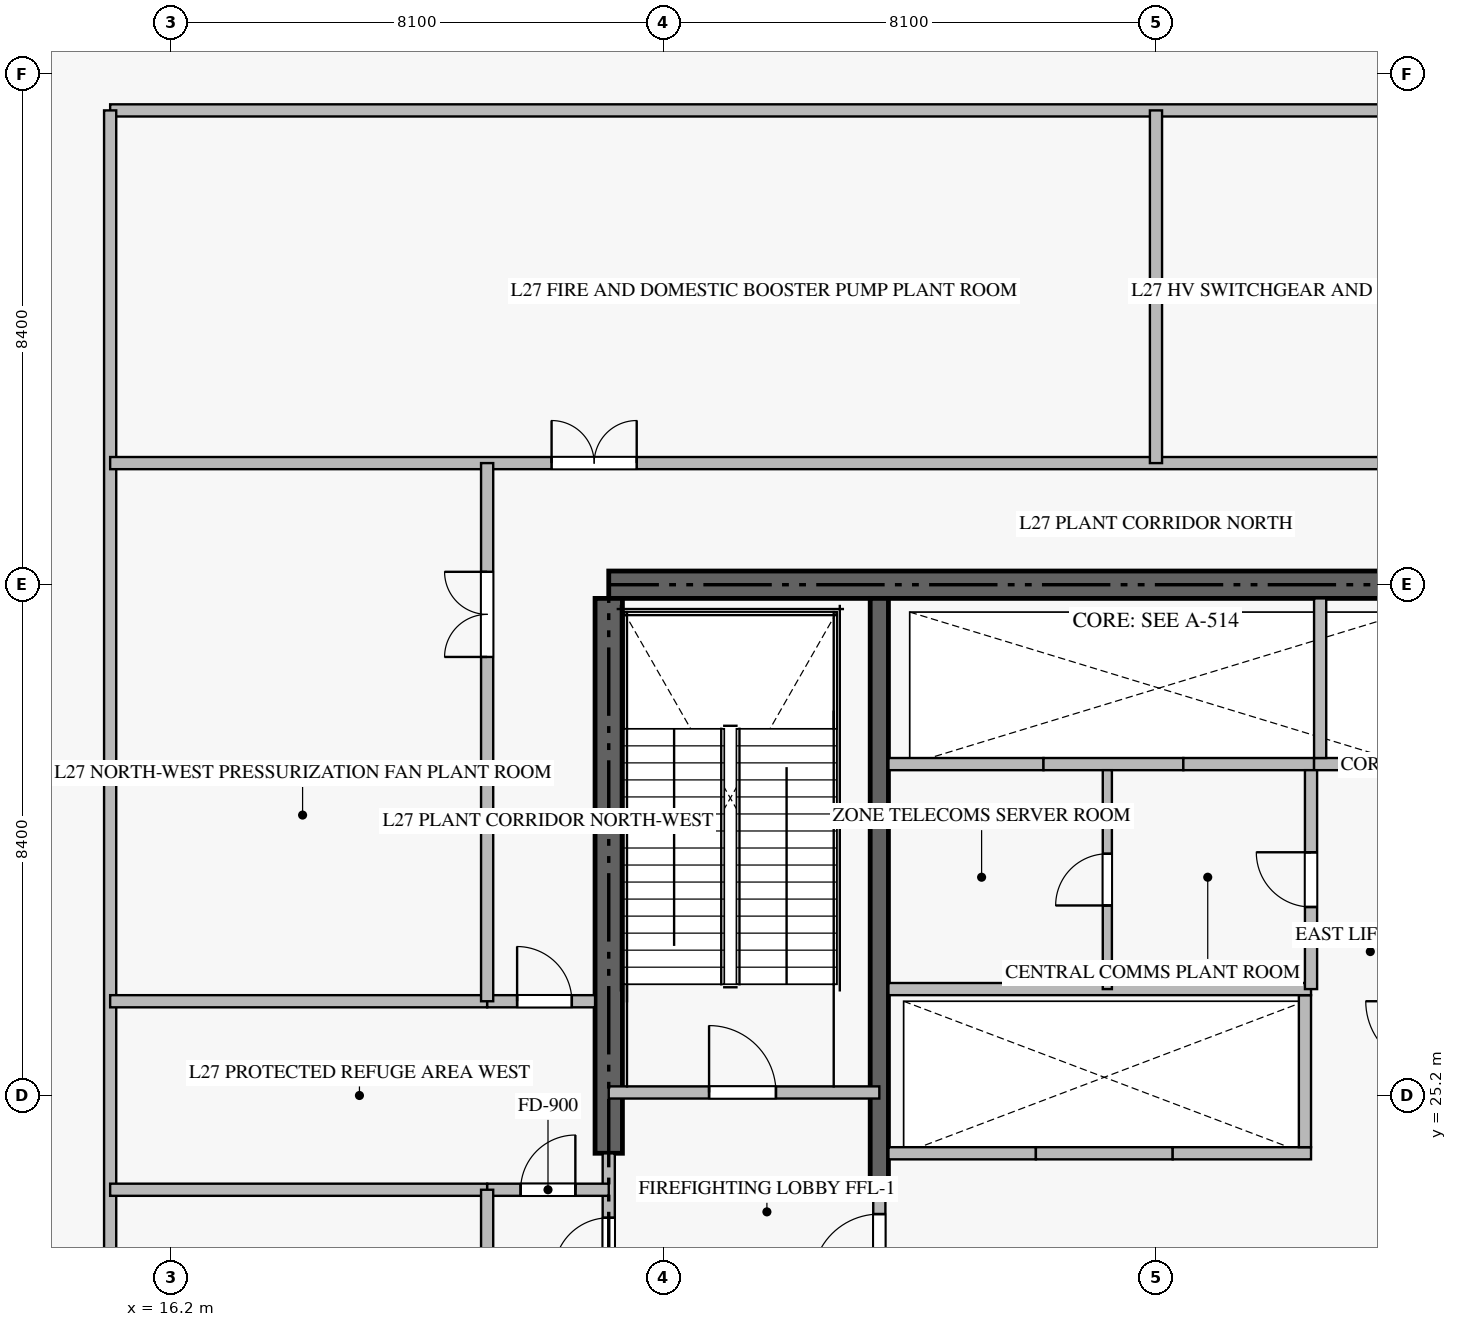
"""IFC4 building model, lengths in metres.
Left out: names, types, materials, properties, quantities, classifications, styles, units other than length and angle.
Written with IfcOpenShell. Run it as: python <this file> out.ifc"""

import sys

from ifc_helpers import new_model, si_unit, direction, frame, frame_2d, origin, place, context, subcontext, project, spatial, rectangle, extrude, source, transform, mapped, element, fill, save


model = new_model("IFC4")
c1 = context("Model", 3, precision=1e-05, world=origin(), true_north=direction((0.0, 1.0)))
c2 = subcontext(c1, "Body", "Model", "MODEL_VIEW")
j1 = project(units=[si_unit("LENGTHUNIT", "METRE"), si_unit("PLANEANGLEUNIT", "RADIAN")], contexts=[c1])
p1 = place(None, origin())
s1 = spatial("IfcSite", under=j1, at=p1, CompositionType="ELEMENT")
p2 = place(p1, origin())
s2 = spatial("IfcBuilding", under=s1, at=p2, CompositionType="ELEMENT")
p3 = place(p2, frame((0.0, 0.0, 109.2)))
s3 = spatial("IfcBuildingStorey", under=s2, at=p3, CompositionType="ELEMENT", Elevation=109.2)
p4 = place(p3, frame((41.4, 33.6, -0.36), z_axis=(0.0, 0.0, 1.0), x_axis=(-1.0, 0.0, 0.0)))
e1 = element("IfcWall", 1, at=p4, inside=s3, PredefinedType="SHEAR", context=c2, shape_type="SweptSolid", body=[
    extrude(rectangle(XDim=18.0, YDim=0.45, at=frame_2d((9.0, 0.0))), origin(), (0.0, 0.0, 1.0), 5.998),
])
p5 = place(p3, frame((23.4, 24.25, -0.36), z_axis=(0.0, 0.0, 1.0), x_axis=(0.0, 1.0, 0.0)))
e2 = element("IfcWall", 2, at=p5, inside=s3, PredefinedType="SHEAR", context=c2, shape_type="SweptSolid", body=[
    extrude(rectangle(XDim=9.125, YDim=0.45, at=frame_2d((4.562, 0.0))), origin(), (0.0, 0.0, 1.0), 5.998),
])
p6 = place(p3, frame((27.85, 23.55, -0.36), z_axis=(0.0, 0.0, 1.0), x_axis=(0.0, 1.0, 0.0)))
e3 = element("IfcWall", 3, at=p6, inside=s3, PredefinedType="SHEAR", context=c2, shape_type="SweptSolid", body=[
    extrude(rectangle(XDim=9.825, YDim=0.3, at=frame_2d((4.913, 0.0))), origin(), (0.0, 0.0, 1.0), 5.998),
])
p7 = place(p3, frame((23.4, 25.25, 0.0), z_axis=(0.0, 0.0, 1.0), x_axis=(1.0, 0.0, 0.0)))
e4 = element("IfcWall", 4, at=p7, inside=s3, PredefinedType="STANDARD", context=c2, shape_type="SweptSolid", body=[
    extrude(rectangle(XDim=4.45, YDim=0.2, at=frame_2d((2.225, 0.0))), origin(), (0.0, 0.0, 1.0), 5.64),
])
p8 = place(p7, frame((1.65, 0.0, 0.0)))
e5 = element("IfcOpeningElement", 5, at=p8, cuts=e4, PredefinedType="OPENING", context=c2, shape_type="SweptSolid", body=[
    extrude(rectangle(XDim=1.1, YDim=2.15, at=frame_2d((0.55, 1.075))), frame((0.0, 0.11, 0.0), z_axis=(0.0, -1.0, 0.0), x_axis=(1.0, 0.0, 0.0)), (0.0, 0.0, 1.0), 0.22),
])
p9 = place(p3, frame((28.0, 24.25, 0.0), z_axis=(0.0, 0.0, 1.0), x_axis=(1.0, 0.0, 0.0)))
e6 = element("IfcWall", 6, at=p9, inside=s3, PredefinedType="STANDARD", context=c2, shape_type="SweptSolid", body=[
    extrude(rectangle(XDim=2.425, YDim=0.2, at=frame_2d((1.212, 0.0))), origin(), (0.0, 0.0, 1.0), 5.64),
])
p10 = place(p3, frame((30.425, 24.25, 0.0), z_axis=(0.0, 0.0, 1.0), x_axis=(1.0, 0.0, 0.0)))
e7 = element("IfcWall", 7, at=p10, inside=s3, PredefinedType="STANDARD", context=c2, shape_type="SweptSolid", body=[
    extrude(rectangle(XDim=2.25, YDim=0.2, at=frame_2d((1.125, 0.0))), origin(), (0.0, 0.0, 1.0), 5.64),
])
p11 = place(p3, frame((32.675, 24.25, 0.0), z_axis=(0.0, 0.0, 1.0), x_axis=(1.0, 0.0, 0.0)))
e8 = element("IfcWall", 8, at=p11, inside=s3, PredefinedType="STANDARD", context=c2, shape_type="SweptSolid", body=[
    extrude(rectangle(XDim=2.275, YDim=0.2, at=frame_2d((1.137, 0.0))), origin(), (0.0, 0.0, 1.0), 5.64),
])
p12 = place(p3, frame((34.85, 24.35, 0.0), z_axis=(0.0, 0.0, 1.0), x_axis=(0.0, 1.0, 0.0)))
e9 = element("IfcWall", 9, at=p12, inside=s3, PredefinedType="STANDARD", context=c2, shape_type="SweptSolid", body=[
    extrude(rectangle(XDim=2.5, YDim=0.2, at=frame_2d((1.25, 0.0))), origin(), (0.0, 0.0, 1.0), 5.64),
])
p13 = place(p3, frame((28.0, 30.65, 0.0), z_axis=(0.0, 0.0, 1.0), x_axis=(1.0, 0.0, 0.0)))
e10 = element("IfcWall", 10, at=p13, inside=s3, PredefinedType="STANDARD", context=c2, shape_type="SweptSolid", body=[
    extrude(rectangle(XDim=2.55, YDim=0.2, at=frame_2d((1.275, 0.0))), origin(), (0.0, 0.0, 1.0), 5.64),
])
p14 = place(p3, frame((30.55, 30.65, 0.0), z_axis=(0.0, 0.0, 1.0), x_axis=(1.0, 0.0, 0.0)))
e11 = element("IfcWall", 11, at=p14, inside=s3, PredefinedType="STANDARD", context=c2, shape_type="SweptSolid", body=[
    extrude(rectangle(XDim=2.3, YDim=0.2, at=frame_2d((1.15, 0.0))), origin(), (0.0, 0.0, 1.0), 5.64),
])
p15 = place(p3, frame((32.85, 30.65, 0.0), z_axis=(0.0, 0.0, 1.0), x_axis=(1.0, 0.0, 0.0)))
e12 = element("IfcWall", 12, at=p15, inside=s3, PredefinedType="STANDARD", context=c2, shape_type="SweptSolid", body=[
    extrude(rectangle(XDim=2.15, YDim=0.2, at=frame_2d((1.075, 0.0))), origin(), (0.0, 0.0, 1.0), 5.64),
])
p16 = place(p3, frame((35.0, 30.65, 0.0), z_axis=(0.0, 0.0, 1.0), x_axis=(1.0, 0.0, 0.0)))
e13 = element("IfcWall", 13, at=p16, inside=s3, PredefinedType="STANDARD", context=c2, shape_type="SweptSolid", body=[
    extrude(rectangle(XDim=1.8, YDim=0.2, at=frame_2d((0.9, 0.0))), origin(), (0.0, 0.0, 1.0), 5.64),
])
p17 = place(p3, frame((35.1, 30.75, 0.0), z_axis=(0.0, 0.0, 1.0), x_axis=(0.0, 1.0, 0.0)))
e14 = element("IfcWall", 14, at=p17, inside=s3, PredefinedType="STANDARD", context=c2, shape_type="SweptSolid", body=[
    extrude(rectangle(XDim=2.625, YDim=0.2, at=frame_2d((1.312, 0.0))), origin(), (0.0, 0.0, 1.0), 5.64),
])
p18 = place(p3, frame((23.4, 21.852, 0.0), z_axis=(0.0, 0.0, 1.0), x_axis=(0.0, 1.0, 0.0)))
e15 = element("IfcWall", 15, at=p18, inside=s3, PredefinedType="STANDARD", context=c2, shape_type="SweptSolid", body=[
    extrude(rectangle(XDim=2.396, YDim=0.2, at=frame_2d((1.198, 0.0))), origin(), (0.0, 0.0, 1.0), 5.64),
])
p19 = place(p18, frame((0.437, 0.0, 0.0)))
e16 = element("IfcOpeningElement", 16, at=p19, cuts=e15, PredefinedType="OPENING", context=c2, shape_type="SweptSolid", body=[
    extrude(rectangle(XDim=0.9, YDim=2.1, at=frame_2d((0.45, 1.05))), frame((0.0, 0.11, 0.0), z_axis=(0.0, -1.0, 0.0), x_axis=(1.0, 0.0, 0.0)), (0.0, 0.0, 1.0), 0.22),
])
p20 = place(p3, frame((27.85, 21.852, 0.0), z_axis=(0.0, 0.0, 1.0), x_axis=(0.0, 1.0, 0.0)))
e17 = element("IfcWall", 17, at=p20, inside=s3, PredefinedType="STANDARD", context=c2, shape_type="SweptSolid", body=[
    extrude(rectangle(XDim=1.696, YDim=0.2, at=frame_2d((0.848, 0.0))), origin(), (0.0, 0.0, 1.0), 5.64),
])
p21 = place(p20, frame((0.298, 0.0, 0.0)))
e18 = element("IfcOpeningElement", 18, at=p21, cuts=e17, PredefinedType="OPENING", context=c2, shape_type="SweptSolid", body=[
    extrude(rectangle(XDim=1.1, YDim=2.15, at=frame_2d((0.55, 1.075))), frame((0.0, 0.11, 0.0), z_axis=(0.0, -1.0, 0.0), x_axis=(1.0, 0.0, 0.0)), (0.0, 0.0, 1.0), 0.22),
])
p22 = place(p3, frame((28.0, 26.95, 0.0), z_axis=(0.0, 0.0, 1.0), x_axis=(1.0, 0.0, 0.0)))
e19 = element("IfcWall", 19, at=p22, inside=s3, PredefinedType="STANDARD", context=c2, shape_type="SweptSolid", body=[
    extrude(rectangle(XDim=6.95, YDim=0.2, at=frame_2d((3.475, 0.0))), origin(), (0.0, 0.0, 1.0), 5.64),
])
p23 = place(p3, frame((34.95, 26.95, 0.0), z_axis=(0.0, 0.0, 1.0), x_axis=(0.0, 1.0, 0.0)))
e20 = element("IfcWall", 20, at=p23, inside=s3, PredefinedType="STANDARD", context=c2, shape_type="SweptSolid", body=[
    extrude(rectangle(XDim=3.6, YDim=0.2, at=frame_2d((1.8, 0.0))), origin(), (0.0, 0.0, 1.0), 5.64),
])
p24 = place(p23, frame((1.35, 0.0, 0.0)))
e21 = element("IfcOpeningElement", 21, at=p24, cuts=e20, PredefinedType="OPENING", context=c2, shape_type="SweptSolid", body=[
    extrude(rectangle(XDim=0.9, YDim=2.1, at=frame_2d((0.45, 1.05))), frame((0.0, 0.11, 0.0), z_axis=(0.0, -1.0, 0.0), x_axis=(1.0, 0.0, 0.0)), (0.0, 0.0, 1.0), 0.22),
])
p25 = place(p3, frame((31.6, 26.95, 0.0), z_axis=(0.0, 0.0, 1.0), x_axis=(0.0, 1.0, 0.0)))
e22 = element("IfcWall", 22, at=p25, inside=s3, PredefinedType="PARTITIONING", context=c2, shape_type="SweptSolid", body=[
    extrude(rectangle(XDim=3.6, YDim=0.15, at=frame_2d((1.8, 0.0))), origin(), (0.0, 0.0, 1.0), 5.64),
])
p26 = place(p25, frame((1.375, 0.0, 0.0)))
e23 = element("IfcOpeningElement", 23, at=p26, cuts=e22, PredefinedType="OPENING", context=c2, shape_type="SweptSolid", body=[
    extrude(rectangle(XDim=0.85, YDim=2.1, at=frame_2d((0.425, 1.05))), frame((0.0, 0.085, 0.0), z_axis=(0.0, -1.0, 0.0), x_axis=(1.0, 0.0, 0.0)), (0.0, 0.0, 1.0), 0.17),
])
p27 = place(p3, frame((15.2, 41.4, 0.0), z_axis=(0.0, 0.0, 1.0), x_axis=(1.0, 0.0, 0.0)))
e24 = element("IfcWall", 24, at=p27, inside=s3, PredefinedType="STANDARD", context=c2, shape_type="SweptSolid", body=[
    extrude(rectangle(XDim=34.4, YDim=0.2, at=frame_2d((17.2, 0.0))), origin(), (0.0, 0.0, 1.0), 5.64),
])
p28 = place(p3, frame((15.2, 9.0, 0.0), z_axis=(0.0, 0.0, 1.0), x_axis=(0.0, 1.0, 0.0)))
e25 = element("IfcWall", 25, at=p28, inside=s3, PredefinedType="STANDARD", context=c2, shape_type="SweptSolid", body=[
    extrude(rectangle(XDim=32.4, YDim=0.2, at=frame_2d((16.2, 0.0))), origin(), (0.0, 0.0, 1.0), 5.072),
])
p29 = place(p3, frame((15.2, 23.65, 0.0), z_axis=(0.0, 0.0, 1.0), x_axis=(1.0, 0.0, 0.0)))
e26 = element("IfcWall", 26, at=p29, inside=s3, PredefinedType="STANDARD", context=c2, shape_type="SweptSolid", body=[
    extrude(rectangle(XDim=6.2, YDim=0.2, at=frame_2d((3.1, 0.0))), origin(), (0.0, 0.0, 1.0), 5.64),
])
p30 = place(p3, frame((21.402, 23.65, 0.0), z_axis=(0.0, 0.0, 1.0), x_axis=(1.0, 0.0, 0.0)))
e27 = element("IfcWall", 27, at=p30, inside=s3, PredefinedType="STANDARD", context=c2, shape_type="SweptSolid", body=[
    extrude(rectangle(XDim=1.998, YDim=0.2, at=frame_2d((0.999, 0.0))), origin(), (0.0, 0.0, 1.0), 5.64),
])
p31 = place(p30, frame((0.549, 0.0, 0.0)))
e28 = element("IfcOpeningElement", 28, at=p31, cuts=e27, PredefinedType="OPENING", context=c2, shape_type="SweptSolid", body=[
    extrude(rectangle(XDim=0.9, YDim=2.1, at=frame_2d((0.45, 1.05))), frame((0.0, 0.11, 0.0), z_axis=(0.0, -1.0, 0.0), x_axis=(1.0, 0.0, 0.0)), (0.0, 0.0, 1.0), 0.22),
])
p32 = place(p3, frame((15.2, 26.75, 0.0), z_axis=(0.0, 0.0, 1.0), x_axis=(1.0, 0.0, 0.0)))
e29 = element("IfcWall", 29, at=p32, inside=s3, PredefinedType="STANDARD", context=c2, shape_type="SweptSolid", body=[
    extrude(rectangle(XDim=6.2, YDim=0.2, at=frame_2d((3.1, 0.0))), origin(), (0.0, 0.0, 1.0), 5.64),
])
p33 = place(p3, frame((21.402, 26.75, 0.0), z_axis=(0.0, 0.0, 1.0), x_axis=(1.0, 0.0, 0.0)))
e30 = element("IfcWall", 30, at=p33, inside=s3, PredefinedType="STANDARD", context=c2, shape_type="SweptSolid", body=[
    extrude(rectangle(XDim=1.773, YDim=0.2, at=frame_2d((0.886, 0.0))), origin(), (0.0, 0.0, 1.0), 5.64),
])
p34 = place(p33, frame((0.491, 0.0, 0.0)))
e31 = element("IfcOpeningElement", 31, at=p34, cuts=e30, PredefinedType="OPENING", context=c2, shape_type="SweptSolid", body=[
    extrude(rectangle(XDim=0.9, YDim=2.1, at=frame_2d((0.45, 1.05))), frame((0.0, 0.11, 0.0), z_axis=(0.0, -1.0, 0.0), x_axis=(1.0, 0.0, 0.0)), (0.0, 0.0, 1.0), 0.22),
])
p35 = place(p3, frame((15.2, 35.6, 0.0), z_axis=(0.0, 0.0, 1.0), x_axis=(1.0, 0.0, 0.0)))
e32 = element("IfcWall", 32, at=p35, inside=s3, PredefinedType="STANDARD", context=c2, shape_type="SweptSolid", body=[
    extrude(rectangle(XDim=34.4, YDim=0.2, at=frame_2d((17.2, 0.0))), origin(), (0.0, 0.0, 1.0), 5.64),
])
p36 = place(p35, frame((7.26, 0.0, 0.0)))
e33 = element("IfcOpeningElement", 33, at=p36, cuts=e32, PredefinedType="OPENING", context=c2, shape_type="SweptSolid", body=[
    extrude(rectangle(XDim=1.4, YDim=2.2, at=frame_2d((0.7, 1.1))), frame((0.0, 0.11, 0.0), z_axis=(0.0, -1.0, 0.0), x_axis=(1.0, 0.0, 0.0)), (0.0, 0.0, 1.0), 0.22),
])
p37 = place(p35, frame((25.74, 0.0, 0.0)))
e34 = element("IfcOpeningElement", 34, at=p37, cuts=e32, PredefinedType="OPENING", context=c2, shape_type="SweptSolid", body=[
    extrude(rectangle(XDim=1.4, YDim=2.2, at=frame_2d((0.7, 1.1))), frame((0.0, 0.11, 0.0), z_axis=(0.0, -1.0, 0.0), x_axis=(1.0, 0.0, 0.0)), (0.0, 0.0, 1.0), 0.22),
])
p38 = place(p3, frame((32.4, 35.6, 0.0), z_axis=(0.0, 0.0, 1.0), x_axis=(0.0, 1.0, 0.0)))
e35 = element("IfcWall", 35, at=p38, inside=s3, PredefinedType="STANDARD", context=c2, shape_type="SweptSolid", body=[
    extrude(rectangle(XDim=5.8, YDim=0.2, at=frame_2d((2.9, 0.0))), origin(), (0.0, 0.0, 1.0), 5.64),
])
p39 = place(p3, frame((21.4, 14.8, 0.0), z_axis=(0.0, 0.0, 1.0), x_axis=(0.0, 1.0, 0.0)))
e36 = element("IfcWall", 36, at=p39, inside=s3, PredefinedType="STANDARD", context=c2, shape_type="SweptSolid", body=[
    extrude(rectangle(XDim=8.85, YDim=0.2, at=frame_2d((4.425, 0.0))), origin(), (0.0, 0.0, 1.0), 5.64),
])
p40 = place(p39, frame((1.788, 0.0, 0.0)))
e37 = element("IfcOpeningElement", 37, at=p40, cuts=e36, PredefinedType="OPENING", context=c2, shape_type="SweptSolid", body=[
    extrude(rectangle(XDim=1.4, YDim=2.2, at=frame_2d((0.7, 1.1))), frame((0.0, 0.11, 0.0), z_axis=(0.0, -1.0, 0.0), x_axis=(1.0, 0.0, 0.0)), (0.0, 0.0, 1.0), 0.22),
])
p41 = place(p3, frame((21.4, 26.75, 0.0), z_axis=(0.0, 0.0, 1.0), x_axis=(0.0, 1.0, 0.0)))
e38 = element("IfcWall", 38, at=p41, inside=s3, PredefinedType="STANDARD", context=c2, shape_type="SweptSolid", body=[
    extrude(rectangle(XDim=8.85, YDim=0.2, at=frame_2d((4.425, 0.0))), origin(), (0.0, 0.0, 1.0), 5.64),
])
p42 = place(p41, frame((5.662, 0.0, 0.0)))
e39 = element("IfcOpeningElement", 39, at=p42, cuts=e38, PredefinedType="OPENING", context=c2, shape_type="SweptSolid", body=[
    extrude(rectangle(XDim=1.4, YDim=2.2, at=frame_2d((0.7, 1.1))), frame((0.0, 0.11, 0.0), z_axis=(0.0, -1.0, 0.0), x_axis=(1.0, 0.0, 0.0)), (0.0, 0.0, 1.0), 0.22),
])
m1 = source(origin(), c2, "Body", "SweptSolid", [
    extrude(rectangle(XDim=1.1, YDim=2.15, at=frame_2d((0.55, 1.075))), frame((0.0, 0.025, 0.0), z_axis=(0.0, -1.0, 0.0), x_axis=(1.0, 0.0, 0.0)), (0.0, 0.0, 1.0), 0.05),
])
p43 = place(p8, origin())
e40 = element("IfcDoor", 40, at=p43, inside=s3, OperationType="SINGLE_SWING_LEFT", PredefinedType="DOOR", context=c2, shape_type="MappedRepresentation", body=[
    mapped(m1, transform((0.0, 0.0, 0.0), scale=1.0)),
])
fill(e5, e40)
m2 = source(origin(), c2, "Body", "SweptSolid", [
    extrude(rectangle(XDim=0.9, YDim=2.1, at=frame_2d((0.45, 1.05))), frame((0.0, 0.025, 0.0), z_axis=(0.0, -1.0, 0.0), x_axis=(1.0, 0.0, 0.0)), (0.0, 0.0, 1.0), 0.05),
])
p44 = place(p19, origin())
e41 = element("IfcDoor", 41, at=p44, inside=s3, OperationType="SINGLE_SWING_LEFT", PredefinedType="DOOR", context=c2, shape_type="MappedRepresentation", body=[
    mapped(m2, transform((0.0, 0.0, 0.0), scale=1.0)),
])
fill(e16, e41)
p45 = place(p21, origin())
e42 = element("IfcDoor", 42, at=p45, inside=s3, OperationType="SINGLE_SWING_LEFT", PredefinedType="DOOR", context=c2, shape_type="MappedRepresentation", body=[
    mapped(m1, transform((0.0, 0.0, 0.0), scale=1.0)),
])
fill(e18, e42)
p46 = place(p24, origin())
e43 = element("IfcDoor", 43, at=p46, inside=s3, OperationType="SINGLE_SWING_RIGHT", PredefinedType="DOOR", context=c2, shape_type="MappedRepresentation", body=[
    mapped(m2, transform((0.0, 0.0, 0.0), scale=1.0)),
])
fill(e21, e43)
m3 = source(origin(), c2, "Body", "SweptSolid", [
    extrude(rectangle(XDim=0.85, YDim=2.1, at=frame_2d((0.425, 1.05))), frame((0.0, 0.025, 0.0), z_axis=(0.0, -1.0, 0.0), x_axis=(1.0, 0.0, 0.0)), (0.0, 0.0, 1.0), 0.05),
])
p47 = place(p26, origin())
e44 = element("IfcDoor", 44, at=p47, inside=s3, OperationType="SINGLE_SWING_LEFT", PredefinedType="DOOR", context=c2, shape_type="MappedRepresentation", body=[
    mapped(m3, transform((0.0, 0.0, 0.0), scale=1.0)),
])
fill(e23, e44)
p48 = place(p31, origin())
e45 = element("IfcDoor", 45, at=p48, inside=s3, OperationType="SINGLE_SWING_RIGHT", PredefinedType="DOOR", context=c2, shape_type="MappedRepresentation", body=[
    mapped(m2, transform((0.0, 0.0, 0.0), scale=1.0)),
])
fill(e28, e45)
p49 = place(p34, origin())
e46 = element("IfcDoor", 46, at=p49, inside=s3, OperationType="SINGLE_SWING_LEFT", PredefinedType="DOOR", context=c2, shape_type="MappedRepresentation", body=[
    mapped(m2, transform((0.0, 0.0, 0.0), scale=1.0)),
])
fill(e31, e46)
m4 = source(origin(), c2, "Body", "SweptSolid", [
    extrude(rectangle(XDim=1.4, YDim=2.2, at=frame_2d((0.7, 1.1))), frame((0.0, 0.025, 0.0), z_axis=(0.0, -1.0, 0.0), x_axis=(1.0, 0.0, 0.0)), (0.0, 0.0, 1.0), 0.05),
])
p50 = place(p36, origin())
e47 = element("IfcDoor", 47, at=p50, inside=s3, OperationType="DOUBLE_DOOR_SINGLE_SWING", PredefinedType="DOOR", context=c2, shape_type="MappedRepresentation", body=[
    mapped(m4, transform((0.0, 0.0, 0.0), scale=1.0)),
])
fill(e33, e47)
p51 = place(p42, origin())
e48 = element("IfcDoor", 48, at=p51, inside=s3, OperationType="DOUBLE_DOOR_SINGLE_SWING", PredefinedType="DOOR", context=c2, shape_type="MappedRepresentation", body=[
    mapped(m4, transform((0.0, 0.0, 0.0), scale=1.0)),
])
fill(e39, e48)
save(model, sys.argv[1])
